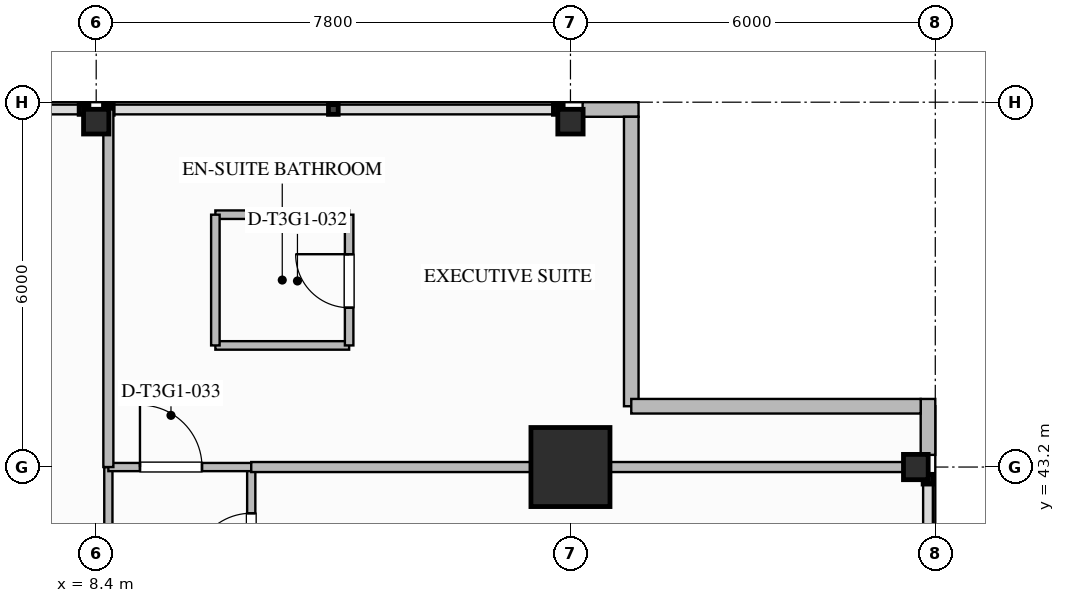
"""IFC4 building model, lengths in metres.
Left out: names, types, materials, properties, quantities, classifications, styles, units other than length and angle.
Written with IfcOpenShell. Run it as: python <this file> out.ifc"""

import sys

from ifc_helpers import new_model, si_unit, direction, frame, frame_2d, origin, origin_2d, place, context, subcontext, project, spatial, rectangle, i_section, extrude, element, fill, save


model = new_model("IFC4")
c1 = context("Model", 3, precision=1e-05, world=origin(), true_north=direction((0.0, 1.0)))
c2 = subcontext(c1, "Body", "Model", "MODEL_VIEW")
j1 = project(units=[si_unit("LENGTHUNIT", "METRE"), si_unit("PLANEANGLEUNIT", "RADIAN")], contexts=[c1])
p1 = place(None, origin())
s1 = spatial("IfcSite", under=j1, at=p1, CompositionType="ELEMENT")
p2 = place(p1, origin())
s2 = spatial("IfcBuilding", under=s1, at=p2, CompositionType="ELEMENT")
p3 = place(p2, frame((0.0, 0.0, 150.4)))
s3 = spatial("IfcBuildingStorey", under=s2, at=p3, CompositionType="ELEMENT", Elevation=150.4)
p4 = place(p3, frame((16.2, 43.2, 0.0), z_axis=(0.0, 0.0, 1.0), x_axis=(1.0, 0.0, 0.0)))
e1 = element("IfcColumn", 1, at=p4, inside=s3, PredefinedType="COLUMN", context=c2, shape_type="SweptSolid", body=[
    extrude(rectangle(XDim=1.3, YDim=1.3, at=origin_2d()), origin(), (0.0, 0.0, 1.0), 3.55),
])
for number, where, z_axis, x_axis in (
    (2, (21.88, 43.2, 0.0), (0.0, 0.0, 1.0), (1.0, 0.0, 0.0)),
    (3, (8.4, 48.88, 0.0), (0.0, 0.0, 1.0), (0.0, 1.0, 0.0)),
    (4, (16.2, 48.88, 0.0), (0.0, 0.0, 1.0), (0.0, 1.0, 0.0)),
):
    element("IfcColumn", number, at=place(p3, frame(where, z_axis=z_axis, x_axis=x_axis)), inside=s3, PredefinedType="COLUMN", context=c2, shape_type="SweptSolid", body=[
        extrude(i_section(OverallWidth=0.406, OverallDepth=0.416, WebThickness=0.03, FlangeThickness=0.048, FilletRadius=0.028, at=origin_2d()), origin(), (0.0, 0.0, 1.0), 3.547),
    ])
for number, where, z_axis, x_axis in (
    (5, (22.08, 44.32, 0.0), (0.0, 0.0, 1.0), (0.0, -1.0, 0.0)),
    (6, (16.4, 49.08, 0.0), (0.0, 0.0, 1.0), (1.0, 0.0, 0.0)),
):
    element("IfcWall", number, at=place(p3, frame(where, z_axis=z_axis, x_axis=x_axis)), inside=s3, PredefinedType="STANDARD", context=c2, shape_type="SweptSolid", body=[
        extrude(rectangle(XDim=0.92, YDim=0.24, at=frame_2d((0.46, 0.0))), origin(), (0.0, 0.0, 1.0), 3.29),
    ])
for number, where, z_axis, x_axis in (
    (7, (17.2, 48.96, 0.0), (0.0, 0.0, 1.0), (0.0, -1.0, 0.0)),
    (8, (17.2, 44.2, 0.0), (0.0, 0.0, 1.0), (1.0, 0.0, 0.0)),
):
    element("IfcWall", number, at=place(p3, frame(where, z_axis=z_axis, x_axis=x_axis)), inside=s3, PredefinedType="STANDARD", context=c2, shape_type="SweptSolid", body=[
        extrude(rectangle(XDim=4.76, YDim=0.24, at=frame_2d((2.38, 0.0))), origin(), (0.0, 0.0, 1.0), 3.29),
    ])
p5 = place(p3, frame((8.6, 37.95, 0.0), z_axis=(0.0, 0.0, 1.0), x_axis=(0.0, 1.0, 0.0)))
e9 = element("IfcWall", 9, at=p5, inside=s3, PredefinedType="PARTITIONING", context=c2, shape_type="SweptSolid", body=[
    extrude(rectangle(XDim=5.25, YDim=0.135, at=frame_2d((2.625, 0.0))), origin(), (0.0, 0.0, 1.0), 2.667),
])
p6 = place(p3, frame((10.95, 10.8, 0.0), z_axis=(0.0, 0.0, 1.0), x_axis=(0.0, 1.0, 0.0)))
e10 = element("IfcWall", 10, at=p6, inside=s3, PredefinedType="PARTITIONING", context=c2, shape_type="SweptSolid", body=[
    extrude(rectangle(XDim=32.4, YDim=0.135, at=frame_2d((16.2, 0.0))), origin(), (0.0, 0.0, 1.0), 3.29),
])
p7 = place(p6, frame((3.189, 0.0, 0.0)))
e11 = element("IfcOpeningElement", 11, at=p7, cuts=e10, PredefinedType="OPENING", context=c2, shape_type="SweptSolid", body=[
    extrude(rectangle(XDim=0.96, YDim=2.15, at=frame_2d((0.48, 1.075))), frame((0.0, 0.077, 0.0), z_axis=(0.0, -1.0, 0.0), x_axis=(1.0, 0.0, 0.0)), (0.0, 0.0, 1.0), 0.155),
])
p8 = place(p6, frame((8.59, 0.0, 0.0)))
e12 = element("IfcOpeningElement", 12, at=p8, cuts=e10, PredefinedType="OPENING", context=c2, shape_type="SweptSolid", body=[
    extrude(rectangle(XDim=0.96, YDim=2.15, at=frame_2d((0.48, 1.075))), frame((0.0, 0.077, 0.0), z_axis=(0.0, -1.0, 0.0), x_axis=(1.0, 0.0, 0.0)), (0.0, 0.0, 1.0), 0.155),
])
p9 = place(p6, frame((12.99, 0.0, 0.0)))
e13 = element("IfcOpeningElement", 13, at=p9, cuts=e10, PredefinedType="OPENING", context=c2, shape_type="SweptSolid", body=[
    extrude(rectangle(XDim=1.02, YDim=2.15, at=frame_2d((0.51, 1.075))), frame((0.0, 0.077, 0.0), z_axis=(0.0, -1.0, 0.0), x_axis=(1.0, 0.0, 0.0)), (0.0, 0.0, 1.0), 0.155),
])
p10 = place(p6, frame((19.635, 0.0, 0.0)))
e14 = element("IfcOpeningElement", 14, at=p10, cuts=e10, PredefinedType="OPENING", context=c2, shape_type="SweptSolid", body=[
    extrude(rectangle(XDim=0.96, YDim=2.15, at=frame_2d((0.48, 1.075))), frame((0.0, 0.077, 0.0), z_axis=(0.0, -1.0, 0.0), x_axis=(1.0, 0.0, 0.0)), (0.0, 0.0, 1.0), 0.155),
])
p11 = place(p6, frame((25.281, 0.0, 0.0)))
e15 = element("IfcOpeningElement", 15, at=p11, cuts=e10, PredefinedType="OPENING", context=c2, shape_type="SweptSolid", body=[
    extrude(rectangle(XDim=0.96, YDim=2.15, at=frame_2d((0.48, 1.075))), frame((0.0, 0.077, 0.0), z_axis=(0.0, -1.0, 0.0), x_axis=(1.0, 0.0, 0.0)), (0.0, 0.0, 1.0), 0.155),
])
p12 = place(p6, frame((30.68, 0.0, 0.0)))
e16 = element("IfcOpeningElement", 16, at=p12, cuts=e10, PredefinedType="OPENING", context=c2, shape_type="SweptSolid", body=[
    extrude(rectangle(XDim=0.96, YDim=2.15, at=frame_2d((0.48, 1.075))), frame((0.0, 0.077, 0.0), z_axis=(0.0, -1.0, 0.0), x_axis=(1.0, 0.0, 0.0)), (0.0, 0.0, 1.0), 0.155),
])
p13 = place(p3, frame((8.6, 43.2, 0.0), z_axis=(0.0, 0.0, 1.0), x_axis=(1.0, 0.0, 0.0)))
e17 = element("IfcWall", 17, at=p13, inside=s3, PredefinedType="PARTITIONING", context=c2, shape_type="SweptSolid", body=[
    extrude(rectangle(XDim=2.35, YDim=0.135, at=frame_2d((1.175, 0.0))), origin(), (0.0, 0.0, 1.0), 2.58),
])
p14 = place(p13, frame((0.52, 0.0, 0.0)))
e18 = element("IfcOpeningElement", 18, at=p14, cuts=e17, PredefinedType="OPENING", context=c2, shape_type="SweptSolid", body=[
    extrude(rectangle(XDim=1.02, YDim=2.15, at=frame_2d((0.51, 1.075))), frame((0.0, 0.077, 0.0), z_axis=(0.0, -1.0, 0.0), x_axis=(1.0, 0.0, 0.0)), (0.0, 0.0, 1.0), 0.155),
])
p15 = place(p3, frame((8.6, 43.2, 0.0), z_axis=(0.0, 0.0, 1.0), x_axis=(0.0, 1.0, 0.0)))
e19 = element("IfcWall", 19, at=p15, inside=s3, PredefinedType="PARTITIONING", context=c2, shape_type="SweptSolid", body=[
    extrude(rectangle(XDim=5.88, YDim=0.165, at=frame_2d((2.94, 0.0))), origin(), (0.0, 0.0, 1.0), 2.58),
])
p16 = place(p3, frame((10.95, 43.2, 0.0), z_axis=(0.0, 0.0, 1.0), x_axis=(1.0, 0.0, 0.0)))
e20 = element("IfcWall", 20, at=p16, inside=s3, PredefinedType="PARTITIONING", context=c2, shape_type="SweptSolid", body=[
    extrude(rectangle(XDim=11.13, YDim=0.165, at=frame_2d((5.565, 0.0))), origin(), (0.0, 0.0, 1.0), 2.58),
])
for number, where, z_axis, x_axis in (
    (21, (10.36, 45.2, 0.0), (0.0, 0.0, 1.0), (1.0, 0.0, 0.0)),
    (22, (10.36, 47.35, 0.0), (0.0, 0.0, 1.0), (1.0, 0.0, 0.0)),
):
    element("IfcWall", number, at=place(p3, frame(where, z_axis=z_axis, x_axis=x_axis)), inside=s3, PredefinedType="PLUMBINGWALL", context=c2, shape_type="SweptSolid", body=[
        extrude(rectangle(XDim=2.2, YDim=0.14, at=frame_2d((1.1, 0.0))), origin(), (0.0, 0.0, 1.0), 3.29),
    ])
p17 = place(p3, frame((10.36, 45.2, 0.0), z_axis=(0.0, 0.0, 1.0), x_axis=(0.0, 1.0, 0.0)))
e23 = element("IfcWall", 23, at=p17, inside=s3, PredefinedType="PLUMBINGWALL", context=c2, shape_type="SweptSolid", body=[
    extrude(rectangle(XDim=2.15, YDim=0.14, at=frame_2d((1.075, 0.0))), origin(), (0.0, 0.0, 1.0), 3.29),
])
p18 = place(p3, frame((12.56, 45.2, 0.0), z_axis=(0.0, 0.0, 1.0), x_axis=(0.0, 1.0, 0.0)))
e24 = element("IfcWall", 24, at=p18, inside=s3, PredefinedType="PLUMBINGWALL", context=c2, shape_type="SweptSolid", body=[
    extrude(rectangle(XDim=2.15, YDim=0.14, at=frame_2d((1.075, 0.0))), origin(), (0.0, 0.0, 1.0), 3.29),
])
p19 = place(p18, frame((0.62, 0.0, 0.0)))
e25 = element("IfcOpeningElement", 25, at=p19, cuts=e24, PredefinedType="OPENING", context=c2, shape_type="SweptSolid", body=[
    extrude(rectangle(XDim=0.88, YDim=2.1, at=frame_2d((0.44, 1.05))), frame((0.0, 0.08, 0.0), z_axis=(0.0, -1.0, 0.0), x_axis=(1.0, 0.0, 0.0)), (0.0, 0.0, 1.0), 0.16),
])
p20 = place(p19, origin())
e26 = element("IfcDoor", 26, at=p20, inside=s3, OperationType="SINGLE_SWING_RIGHT", PredefinedType="DOOR", context=c2, shape_type="SweptSolid", body=[
    extrude(rectangle(XDim=0.88, YDim=2.1, at=frame_2d((0.44, 1.05))), frame((0.0, 0.025, 0.0), z_axis=(0.0, -1.0, 0.0), x_axis=(1.0, 0.0, 0.0)), (0.0, 0.0, 1.0), 0.05),
])
fill(e25, e26)
p21 = place(p14, origin())
e27 = element("IfcDoor", 27, at=p21, inside=s3, OperationType="SINGLE_SWING_LEFT", PredefinedType="DOOR", context=c2, shape_type="SweptSolid", body=[
    extrude(rectangle(XDim=1.02, YDim=2.15, at=frame_2d((0.51, 1.075))), frame((0.0, 0.025, 0.0), z_axis=(0.0, -1.0, 0.0), x_axis=(1.0, 0.0, 0.0)), (0.0, 0.0, 1.0), 0.05),
])
fill(e18, e27)
p22 = place(p12, origin())
e28 = element("IfcDoor", 28, at=p22, inside=s3, OperationType="SINGLE_SWING_LEFT", PredefinedType="DOOR", context=c2, shape_type="SweptSolid", body=[
    extrude(rectangle(XDim=0.96, YDim=2.15, at=frame_2d((0.48, 1.075))), frame((0.0, 0.025, 0.0), z_axis=(0.0, -1.0, 0.0), x_axis=(1.0, 0.0, 0.0)), (0.0, 0.0, 1.0), 0.05),
])
fill(e16, e28)
save(model, sys.argv[1])
